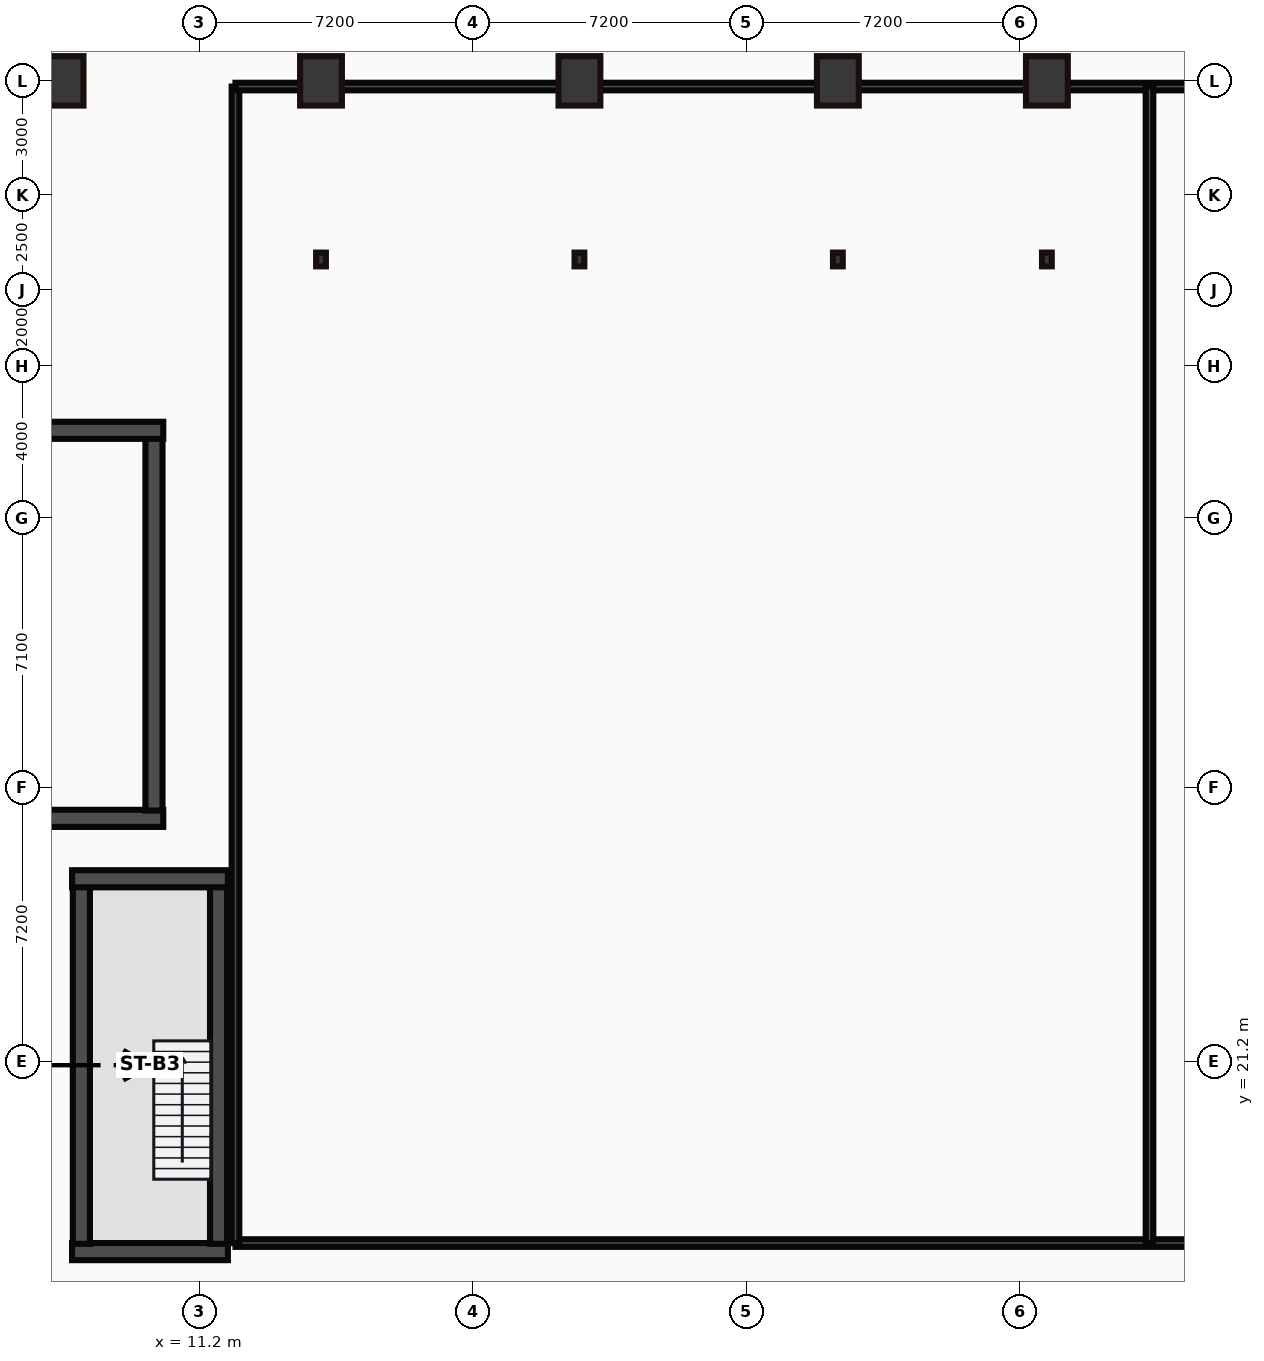
"""IFC4 building model, lengths in metres.
Left out: names, types, materials, properties, quantities, classifications, styles, units other than length and angle.
Written with IfcOpenShell. Run it as: python <this file> out.ifc"""

import sys

from ifc_helpers import new_model, si_unit, direction, frame, frame_2d, origin, origin_2d, place, context, subcontext, project, spatial, rectangle, hollow_rectangle, i_section, extrude, source, transform, mapped, element, fill, save


model = new_model("IFC4")
c1 = context("Model", 3, precision=1e-05, world=origin(), true_north=direction((0.0, 1.0)))
c2 = subcontext(c1, "Body", "Model", "MODEL_VIEW")
j1 = project(units=[si_unit("LENGTHUNIT", "METRE"), si_unit("PLANEANGLEUNIT", "RADIAN")], contexts=[c1])
p1 = place(None, origin())
s1 = spatial("IfcSite", under=j1, at=p1, CompositionType="ELEMENT")
p2 = place(p1, origin())
s2 = spatial("IfcBuilding", under=s1, at=p2, CompositionType="ELEMENT")
p3 = place(p2, frame((0.0, 0.0, -5.0)))
s3 = spatial("IfcBuildingStorey", under=s2, at=p3, CompositionType="ELEMENT", Elevation=-5.0)
m1 = source(origin(), c2, "Body", "SweptSolid", [
    extrude(hollow_rectangle(XDim=1.1, YDim=1.3, WallThickness=0.055, at=origin_2d()), origin(), (0.0, 0.0, 1.0), 5.0),
])
for number, where, z_axis, x_axis in (
    (1, (7.6, 47.0, 0.0), (0.0, 0.0, 1.0), (1.0, 0.0, 0.0)),
    (2, (14.4, 47.0, 0.0), (0.0, 0.0, 1.0), (1.0, 0.0, 0.0)),
    (3, (21.2, 47.0, 0.0), (0.0, 0.0, 1.0), (1.0, 0.0, 0.0)),
    (4, (28.0, 47.0, 0.0), (0.0, 0.0, 1.0), (1.0, 0.0, 0.0)),
    (5, (33.5, 47.0, 0.0), (0.0, 0.0, 1.0), (1.0, 0.0, 0.0)),
):
    element("IfcColumn", number, at=place(p3, frame(where, z_axis=z_axis, x_axis=x_axis)), inside=s3, PredefinedType="PILASTER", context=c2, shape_type="MappedRepresentation", body=[
        mapped(m1, transform((0.0, 0.0, 0.0))),
    ])
m2 = source(origin(), c2, "Body", "SweptSolid", [
    extrude(i_section(OverallWidth=0.257, OverallDepth=0.363, WebThickness=0.013, FlangeThickness=0.022, at=origin_2d()), origin(), (0.0, 0.0, 1.0), 5.0),
])
for number, where, z_axis, x_axis in (
    (6, (14.4, 42.3, 0.0), (0.0, 0.0, 1.0), (1.0, 0.0, 0.0)),
    (7, (21.2, 42.3, 0.0), (0.0, 0.0, 1.0), (1.0, 0.0, 0.0)),
    (8, (28.0, 42.3, 0.0), (0.0, 0.0, 1.0), (1.0, 0.0, 0.0)),
    (9, (33.5, 42.3, 0.0), (0.0, 0.0, 1.0), (1.0, 0.0, 0.0)),
):
    element("IfcColumn", number, at=place(p3, frame(where, z_axis=z_axis, x_axis=x_axis)), inside=s3, PredefinedType="COLUMN", context=c2, shape_type="MappedRepresentation", body=[
        mapped(m2, transform((0.0, 0.0, 0.0))),
    ])
m3 = source(origin(), c2, "Body", "SweptSolid", [
    extrude(rectangle(XDim=5.5, YDim=0.45, at=frame_2d((2.75, 0.0))), origin(), (0.0, 0.0, 1.0), 5.0),
])
p4 = place(p3, frame((4.75, 27.595, 0.0), z_axis=(0.0, 0.0, 1.0), x_axis=(1.0, 0.0, 0.0)))
e10 = element("IfcWall", 10, at=p4, inside=s3, PredefinedType="SHEAR", context=c2, shape_type="MappedRepresentation", body=[
    mapped(m3, transform((0.0, 0.0, 0.0))),
])
m4 = source(origin(), c2, "Body", "SweptSolid", [
    extrude(rectangle(XDim=9.8, YDim=0.45, at=frame_2d((4.9, 0.0))), origin(), (0.0, 0.0, 1.0), 5.0),
])
p5 = place(p3, frame((10.005, 27.8, 0.0), z_axis=(0.0, 0.0, 1.0), x_axis=(0.0, 1.0, 0.0)))
e11 = element("IfcWall", 11, at=p5, inside=s3, PredefinedType="SHEAR", context=c2, shape_type="MappedRepresentation", body=[
    mapped(m4, transform((0.0, 0.0, 0.0))),
])
p6 = place(p3, frame((4.75, 37.805, 0.0), z_axis=(0.0, 0.0, 1.0), x_axis=(1.0, 0.0, 0.0)))
e12 = element("IfcWall", 12, at=p6, inside=s3, PredefinedType="SHEAR", context=c2, shape_type="MappedRepresentation", body=[
    mapped(m3, transform((0.0, 0.0, 0.0))),
])
m5 = source(origin(), c2, "Body", "SweptSolid", [
    extrude(rectangle(XDim=4.1, YDim=0.45, at=frame_2d((2.05, 0.0))), origin(), (0.0, 0.0, 1.0), 5.0),
])
p7 = place(p3, frame((7.85, 16.195, 0.0), z_axis=(0.0, 0.0, 1.0), x_axis=(1.0, 0.0, 0.0)))
e13 = element("IfcWall", 13, at=p7, inside=s3, PredefinedType="SHEAR", context=c2, shape_type="MappedRepresentation", body=[
    mapped(m5, transform((0.0, 0.0, 0.0))),
])
p8 = place(p7, frame((1.5, 0.0, 0.0)))
e14 = element("IfcOpeningElement", 14, at=p8, cuts=e13, PredefinedType="OPENING", context=c2, shape_type="SweptSolid", body=[
    extrude(rectangle(XDim=1.1, YDim=2.15, at=frame_2d((0.55, 1.075))), frame((0.0, 0.235, 0.0), z_axis=(0.0, -1.0, 0.0), x_axis=(1.0, 0.0, 0.0)), (0.0, 0.0, 1.0), 0.47),
])
m6 = source(origin(), c2, "Body", "SweptSolid", [
    extrude(rectangle(XDim=9.4, YDim=0.45, at=frame_2d((4.7, 0.0))), origin(), (0.0, 0.0, 1.0), 5.0),
])
for number, where, z_axis, x_axis in (
    (15, (8.095, 16.4, 0.0), (0.0, 0.0, 1.0), (0.0, 1.0, 0.0)),
    (16, (11.705, 16.4, 0.0), (0.0, 0.0, 1.0), (0.0, 1.0, 0.0)),
):
    element("IfcWall", number, at=place(p3, frame(where, z_axis=z_axis, x_axis=x_axis)), inside=s3, PredefinedType="SHEAR", context=c2, shape_type="MappedRepresentation", body=[
        mapped(m6, transform((0.0, 0.0, 0.0))),
    ])
p9 = place(p3, frame((7.85, 26.005, 0.0), z_axis=(0.0, 0.0, 1.0), x_axis=(1.0, 0.0, 0.0)))
e17 = element("IfcWall", 17, at=p9, inside=s3, PredefinedType="SHEAR", context=c2, shape_type="MappedRepresentation", body=[
    mapped(m5, transform((0.0, 0.0, 0.0))),
])
m7 = source(origin(), c2, "Body", "SweptSolid", [
    extrude(rectangle(XDim=47.0, YDim=0.2, at=frame_2d((23.5, 0.0))), origin(), (0.0, 0.0, 1.0), 4.7),
])
p10 = place(p3, frame((12.15, 16.42, 0.0), z_axis=(0.0, 0.0, 1.0), x_axis=(1.0, 0.0, 0.0)))
e18 = element("IfcWall", 18, at=p10, inside=s3, PredefinedType="PARTITIONING", context=c2, shape_type="MappedRepresentation", body=[
    mapped(m7, transform((0.0, 0.0, 0.0))),
])
p11 = place(p10, frame((6.8, 0.0, 0.0)))
e19 = element("IfcOpeningElement", 19, at=p11, cuts=e18, PredefinedType="OPENING", context=c2, shape_type="SweptSolid", body=[
    extrude(rectangle(XDim=1.1, YDim=2.15, at=frame_2d((0.55, 1.075))), frame((0.0, 0.11, 0.0), z_axis=(0.0, -1.0, 0.0), x_axis=(1.0, 0.0, 0.0)), (0.0, 0.0, 1.0), 0.22),
])
p12 = place(p10, frame((34.2, 0.0, 0.0)))
e20 = element("IfcOpeningElement", 20, at=p12, cuts=e18, PredefinedType="OPENING", context=c2, shape_type="SweptSolid", body=[
    extrude(rectangle(XDim=1.1, YDim=2.15, at=frame_2d((0.55, 1.075))), frame((0.0, 0.11, 0.0), z_axis=(0.0, -1.0, 0.0), x_axis=(1.0, 0.0, 0.0)), (0.0, 0.0, 1.0), 0.22),
])
m8 = source(origin(), c2, "Body", "SweptSolid", [
    extrude(rectangle(XDim=30.43, YDim=0.2, at=frame_2d((15.215, 0.0))), origin(), (0.0, 0.0, 1.0), 4.7),
])
p13 = place(p3, frame((12.15, 16.42, 0.0), z_axis=(0.0, 0.0, 1.0), x_axis=(0.0, 1.0, 0.0)))
e21 = element("IfcWall", 21, at=p13, inside=s3, PredefinedType="PARTITIONING", context=c2, shape_type="MappedRepresentation", body=[
    mapped(m8, transform((0.0, 0.0, 0.0))),
])
m9 = source(origin(), c2, "Body", "SweptSolid", [
    extrude(rectangle(XDim=47.0, YDim=0.2, at=frame_2d((23.5, 0.0))), origin(), (0.0, 0.0, 1.0), 3.844),
])
p14 = place(p3, frame((12.15, 46.85, 0.0), z_axis=(0.0, 0.0, 1.0), x_axis=(1.0, 0.0, 0.0)))
e22 = element("IfcWall", 22, at=p14, inside=s3, PredefinedType="PARTITIONING", context=c2, shape_type="MappedRepresentation", body=[
    mapped(m9, transform((0.0, 0.0, 0.0))),
])
p15 = place(p3, frame((36.2, 16.42, 0.0), z_axis=(0.0, 0.0, 1.0), x_axis=(0.0, 1.0, 0.0)))
e23 = element("IfcWall", 23, at=p15, inside=s3, PredefinedType="PARTITIONING", context=c2, shape_type="MappedRepresentation", body=[
    mapped(m8, transform((0.0, 0.0, 0.0))),
])
m10 = source(origin(), c2, "Body", "SweptSolid", [
    extrude(rectangle(XDim=1.1, YDim=2.15, at=frame_2d((0.55, 1.075))), frame((0.0, 0.025, 0.0), z_axis=(0.0, -1.0, 0.0), x_axis=(1.0, 0.0, 0.0)), (0.0, 0.0, 1.0), 0.05),
])
p16 = place(p11, origin())
e24 = element("IfcDoor", 24, at=p16, inside=s3, OperationType="SINGLE_SWING_LEFT", PredefinedType="DOOR", context=c2, shape_type="MappedRepresentation", body=[
    mapped(m10, transform((0.0, 0.0, 0.0))),
])
fill(e19, e24)
p17 = place(p8, origin())
e25 = element("IfcDoor", 25, at=p17, inside=s3, OperationType="SINGLE_SWING_RIGHT", PredefinedType="DOOR", context=c2, shape_type="MappedRepresentation", body=[
    mapped(m10, transform((0.0, 0.0, 0.0))),
])
fill(e14, e25)
save(model, sys.argv[1])
